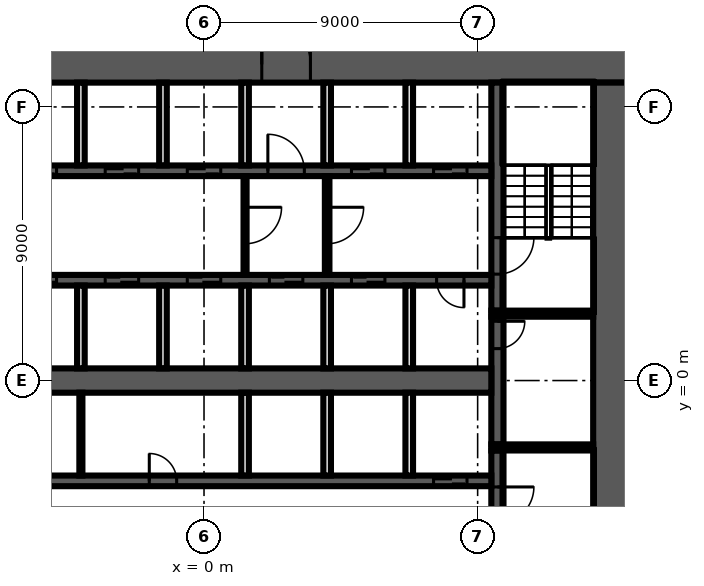
"""IFC4 building model, lengths in metres.
Left out: names, types, materials, properties, quantities, classifications, styles, units other than length and angle.
Written with IfcOpenShell. Run it as: python <this file> out.ifc"""

import sys

from ifc_helpers import new_model, si_unit, direction, frame, frame_2d, origin, place, context, subcontext, project, spatial, rectangle, extrude, element, fill, save


model = new_model("IFC4")
c1 = context("Model", 3, precision=1e-05, world=origin(), true_north=direction((0.0, 1.0)))
c2 = subcontext(c1, "Body", "Model", "MODEL_VIEW")
j1 = project(units=[si_unit("LENGTHUNIT", "METRE"), si_unit("PLANEANGLEUNIT", "RADIAN")], contexts=[c1])
p1 = place(None, origin())
s1 = spatial("IfcSite", under=j1, at=p1, CompositionType="ELEMENT")
p2 = place(p1, origin())
s2 = spatial("IfcBuilding", under=s1, at=p2, CompositionType="ELEMENT")
p3 = place(p2, frame((0.0, 0.0, 19.0)))
s3 = spatial("IfcBuildingStorey", under=s2, at=p3, CompositionType="ELEMENT", Elevation=19.0)
p4 = place(p3, frame((-14.0, 10.4, 0.0), z_axis=(0.0, 0.0, 1.0), x_axis=(1.0, 0.0, 0.0)))
e1 = element("IfcWall", 1, at=p4, inside=s3, PredefinedType="SHEAR", context=c2, shape_type="SweptSolid", body=[
    extrude(rectangle(XDim=28.0, YDim=1.2, at=frame_2d((14.0, 0.0))), origin(), (0.0, 0.0, 1.0), 7.55),
])
p5 = place(p4, frame((15.9, 0.0, 0.0)))
e2 = element("IfcOpeningElement", 2, at=p5, cuts=e1, PredefinedType="OPENING", context=c2, shape_type="SweptSolid", body=[
    extrude(rectangle(XDim=1.6, YDim=2.1, at=frame_2d((0.8, 1.05))), frame((0.0, 0.61, 0.0), z_axis=(0.0, -1.0, 0.0), x_axis=(1.0, 0.0, 0.0)), (0.0, 0.0, 1.0), 1.22),
])
p6 = place(p3, frame((13.4, 9.8, 0.0), z_axis=(0.0, 0.0, 1.0), x_axis=(0.0, -1.0, 0.0)))
e3 = element("IfcWall", 3, at=p6, inside=s3, PredefinedType="SHEAR", context=c2, shape_type="SweptSolid", body=[
    extrude(rectangle(XDim=19.6, YDim=1.2, at=frame_2d((9.8, 0.0))), origin(), (0.0, 0.0, 1.0), 7.55),
])
p7 = place(p3, frame((9.65, -2.3, 0.0), z_axis=(0.0, 0.0, 1.0), x_axis=(0.0, -1.0, 0.0)))
e4 = element("IfcWall", 4, at=p7, inside=s3, PredefinedType="SHEAR", context=c2, shape_type="SweptSolid", body=[
    extrude(rectangle(XDim=7.5, YDim=0.4, at=frame_2d((3.75, 0.0))), origin(), (0.0, 0.0, 1.0), 7.55),
])
p8 = place(p7, frame((1.2, 0.0, 0.0)))
e5 = element("IfcOpeningElement", 5, at=p8, cuts=e4, PredefinedType="OPENING", context=c2, shape_type="SweptSolid", body=[
    extrude(rectangle(XDim=1.2, YDim=2.1, at=frame_2d((0.6, 1.05))), frame((0.0, 0.21, 0.0), z_axis=(0.0, -1.0, 0.0), x_axis=(1.0, 0.0, 0.0)), (0.0, 0.0, 1.0), 0.42),
])
p9 = place(p3, frame((9.65, 2.1, 0.0), z_axis=(0.0, 0.0, 1.0), x_axis=(0.0, -1.0, 0.0)))
e6 = element("IfcWall", 6, at=p9, inside=s3, PredefinedType="SHEAR", context=c2, shape_type="SweptSolid", body=[
    extrude(rectangle(XDim=4.2, YDim=0.4, at=frame_2d((2.1, 0.0))), origin(), (0.0, 0.0, 1.0), 7.55),
])
p10 = place(p9, frame((0.15, 0.0, 0.0)))
e7 = element("IfcOpeningElement", 7, at=p10, cuts=e6, PredefinedType="OPENING", context=c2, shape_type="SweptSolid", body=[
    extrude(rectangle(XDim=0.9, YDim=2.1, at=frame_2d((0.45, 1.05))), frame((0.0, 0.21, 0.0), z_axis=(0.0, -1.0, 0.0), x_axis=(1.0, 0.0, 0.0)), (0.0, 0.0, 1.0), 0.42),
])
p11 = place(p3, frame((9.65, 9.8, 0.0), z_axis=(0.0, 0.0, 1.0), x_axis=(0.0, -1.0, 0.0)))
e8 = element("IfcWall", 8, at=p11, inside=s3, PredefinedType="SHEAR", context=c2, shape_type="SweptSolid", body=[
    extrude(rectangle(XDim=7.5, YDim=0.4, at=frame_2d((3.75, 0.0))), origin(), (0.0, 0.0, 1.0), 7.55),
])
p12 = place(p11, frame((5.1, 0.0, 0.0)))
e9 = element("IfcOpeningElement", 9, at=p12, cuts=e8, PredefinedType="OPENING", context=c2, shape_type="SweptSolid", body=[
    extrude(rectangle(XDim=1.2, YDim=2.1, at=frame_2d((0.6, 1.05))), frame((0.0, 0.21, 0.0), z_axis=(0.0, -1.0, 0.0), x_axis=(1.0, 0.0, 0.0)), (0.0, 0.0, 1.0), 0.42),
])
for number, where, z_axis, x_axis in (
    (10, (9.45, 2.2, 0.0), (0.0, 0.0, 1.0), (1.0, 0.0, 0.0)),
    (11, (9.45, -2.2, 0.0), (0.0, 0.0, 1.0), (1.0, 0.0, 0.0)),
):
    element("IfcWall", number, at=place(p3, frame(where, z_axis=z_axis, x_axis=x_axis)), inside=s3, PredefinedType="SHEAR", context=c2, shape_type="SweptSolid", body=[
        extrude(rectangle(XDim=3.35, YDim=0.2, at=frame_2d((1.675, 0.0))), origin(), (0.0, 0.0, 1.0), 7.55),
    ])
p13 = place(p3, frame((-9.45, 6.9, 0.0), z_axis=(0.0, 0.0, 1.0), x_axis=(1.0, 0.0, 0.0)))
e12 = element("IfcWall", 12, at=p13, inside=s3, PredefinedType="SHEAR", context=c2, shape_type="SweptSolid", body=[
    extrude(rectangle(XDim=18.9, YDim=0.35, at=frame_2d((9.45, 0.0))), origin(), (0.0, 0.0, 1.0), 7.55),
])
p14 = place(p13, frame((0.8, 0.0, 0.0)))
e13 = element("IfcOpeningElement", 13, at=p14, cuts=e12, PredefinedType="OPENING", context=c2, shape_type="SweptSolid", body=[
    extrude(rectangle(XDim=1.1, YDim=2.1, at=frame_2d((0.55, 1.05))), frame((0.0, 0.185, 0.0), z_axis=(0.0, -1.0, 0.0), x_axis=(1.0, 0.0, 0.0)), (0.0, 0.0, 1.0), 0.37),
])
p15 = place(p13, frame((3.5, 0.0, 0.0)))
e14 = element("IfcOpeningElement", 14, at=p15, cuts=e12, PredefinedType="OPENING", context=c2, shape_type="SweptSolid", body=[
    extrude(rectangle(XDim=1.1, YDim=2.1, at=frame_2d((0.55, 1.05))), frame((0.0, 0.185, 0.0), z_axis=(0.0, -1.0, 0.0), x_axis=(1.0, 0.0, 0.0)), (0.0, 0.0, 1.0), 0.37),
])
p16 = place(p13, frame((6.2, 0.0, 0.0)))
e15 = element("IfcOpeningElement", 15, at=p16, cuts=e12, PredefinedType="OPENING", context=c2, shape_type="SweptSolid", body=[
    extrude(rectangle(XDim=1.1, YDim=2.1, at=frame_2d((0.55, 1.05))), frame((0.0, 0.185, 0.0), z_axis=(0.0, -1.0, 0.0), x_axis=(1.0, 0.0, 0.0)), (0.0, 0.0, 1.0), 0.37),
])
p17 = place(p13, frame((8.9, 0.0, 0.0)))
e16 = element("IfcOpeningElement", 16, at=p17, cuts=e12, PredefinedType="OPENING", context=c2, shape_type="SweptSolid", body=[
    extrude(rectangle(XDim=1.1, YDim=2.1, at=frame_2d((0.55, 1.05))), frame((0.0, 0.185, 0.0), z_axis=(0.0, -1.0, 0.0), x_axis=(1.0, 0.0, 0.0)), (0.0, 0.0, 1.0), 0.37),
])
p18 = place(p13, frame((11.55, 0.0, 0.0)))
e17 = element("IfcOpeningElement", 17, at=p18, cuts=e12, PredefinedType="OPENING", context=c2, shape_type="SweptSolid", body=[
    extrude(rectangle(XDim=1.2, YDim=2.1, at=frame_2d((0.6, 1.05))), frame((0.0, 0.185, 0.0), z_axis=(0.0, -1.0, 0.0), x_axis=(1.0, 0.0, 0.0)), (0.0, 0.0, 1.0), 0.37),
])
p19 = place(p13, frame((14.3, 0.0, 0.0)))
e18 = element("IfcOpeningElement", 18, at=p19, cuts=e12, PredefinedType="OPENING", context=c2, shape_type="SweptSolid", body=[
    extrude(rectangle(XDim=1.1, YDim=2.1, at=frame_2d((0.55, 1.05))), frame((0.0, 0.185, 0.0), z_axis=(0.0, -1.0, 0.0), x_axis=(1.0, 0.0, 0.0)), (0.0, 0.0, 1.0), 0.37),
])
p20 = place(p13, frame((17.0, 0.0, 0.0)))
e19 = element("IfcOpeningElement", 19, at=p20, cuts=e12, PredefinedType="OPENING", context=c2, shape_type="SweptSolid", body=[
    extrude(rectangle(XDim=1.1, YDim=2.1, at=frame_2d((0.55, 1.05))), frame((0.0, 0.185, 0.0), z_axis=(0.0, -1.0, 0.0), x_axis=(1.0, 0.0, 0.0)), (0.0, 0.0, 1.0), 0.37),
])
p21 = place(p3, frame((9.45, 3.3, 0.0), z_axis=(0.0, 0.0, 1.0), x_axis=(-1.0, 0.0, 0.0)))
e20 = element("IfcWall", 20, at=p21, inside=s3, PredefinedType="SHEAR", context=c2, shape_type="SweptSolid", body=[
    extrude(rectangle(XDim=18.9, YDim=0.35, at=frame_2d((9.45, 0.0))), origin(), (0.0, 0.0, 1.0), 7.55),
])
p22 = place(p21, frame((17.0, 0.0, 0.0)))
e21 = element("IfcOpeningElement", 21, at=p22, cuts=e20, PredefinedType="OPENING", context=c2, shape_type="SweptSolid", body=[
    extrude(rectangle(XDim=1.1, YDim=2.1, at=frame_2d((0.55, 1.05))), frame((0.0, 0.185, 0.0), z_axis=(0.0, -1.0, 0.0), x_axis=(1.0, 0.0, 0.0)), (0.0, 0.0, 1.0), 0.37),
])
p23 = place(p21, frame((14.3, 0.0, 0.0)))
e22 = element("IfcOpeningElement", 22, at=p23, cuts=e20, PredefinedType="OPENING", context=c2, shape_type="SweptSolid", body=[
    extrude(rectangle(XDim=1.1, YDim=2.1, at=frame_2d((0.55, 1.05))), frame((0.0, 0.185, 0.0), z_axis=(0.0, -1.0, 0.0), x_axis=(1.0, 0.0, 0.0)), (0.0, 0.0, 1.0), 0.37),
])
p24 = place(p21, frame((11.6, 0.0, 0.0)))
e23 = element("IfcOpeningElement", 23, at=p24, cuts=e20, PredefinedType="OPENING", context=c2, shape_type="SweptSolid", body=[
    extrude(rectangle(XDim=1.1, YDim=2.1, at=frame_2d((0.55, 1.05))), frame((0.0, 0.185, 0.0), z_axis=(0.0, -1.0, 0.0), x_axis=(1.0, 0.0, 0.0)), (0.0, 0.0, 1.0), 0.37),
])
p25 = place(p21, frame((8.9, 0.0, 0.0)))
e24 = element("IfcOpeningElement", 24, at=p25, cuts=e20, PredefinedType="OPENING", context=c2, shape_type="SweptSolid", body=[
    extrude(rectangle(XDim=1.1, YDim=2.1, at=frame_2d((0.55, 1.05))), frame((0.0, 0.185, 0.0), z_axis=(0.0, -1.0, 0.0), x_axis=(1.0, 0.0, 0.0)), (0.0, 0.0, 1.0), 0.37),
])
p26 = place(p21, frame((6.2, 0.0, 0.0)))
e25 = element("IfcOpeningElement", 25, at=p26, cuts=e20, PredefinedType="OPENING", context=c2, shape_type="SweptSolid", body=[
    extrude(rectangle(XDim=1.1, YDim=2.1, at=frame_2d((0.55, 1.05))), frame((0.0, 0.185, 0.0), z_axis=(0.0, -1.0, 0.0), x_axis=(1.0, 0.0, 0.0)), (0.0, 0.0, 1.0), 0.37),
])
p27 = place(p21, frame((3.5, 0.0, 0.0)))
e26 = element("IfcOpeningElement", 26, at=p27, cuts=e20, PredefinedType="OPENING", context=c2, shape_type="SweptSolid", body=[
    extrude(rectangle(XDim=1.1, YDim=2.1, at=frame_2d((0.55, 1.05))), frame((0.0, 0.185, 0.0), z_axis=(0.0, -1.0, 0.0), x_axis=(1.0, 0.0, 0.0)), (0.0, 0.0, 1.0), 0.37),
])
p28 = place(p21, frame((0.9, 0.0, 0.0)))
e27 = element("IfcOpeningElement", 27, at=p28, cuts=e20, PredefinedType="OPENING", context=c2, shape_type="SweptSolid", body=[
    extrude(rectangle(XDim=0.9, YDim=2.1, at=frame_2d((0.45, 1.05))), frame((0.0, 0.185, 0.0), z_axis=(0.0, -1.0, 0.0), x_axis=(1.0, 0.0, 0.0)), (0.0, 0.0, 1.0), 0.37),
])
p29 = place(p3, frame((-9.45, -3.3, 0.0), z_axis=(0.0, 0.0, 1.0), x_axis=(1.0, 0.0, 0.0)))
e28 = element("IfcWall", 28, at=p29, inside=s3, PredefinedType="SHEAR", context=c2, shape_type="SweptSolid", body=[
    extrude(rectangle(XDim=18.9, YDim=0.35, at=frame_2d((9.45, 0.0))), origin(), (0.0, 0.0, 1.0), 7.55),
])
p30 = place(p29, frame((17.0, 0.0, 0.0)))
e29 = element("IfcOpeningElement", 29, at=p30, cuts=e28, PredefinedType="OPENING", context=c2, shape_type="SweptSolid", body=[
    extrude(rectangle(XDim=1.1, YDim=2.1, at=frame_2d((0.55, 1.05))), frame((0.0, 0.185, 0.0), z_axis=(0.0, -1.0, 0.0), x_axis=(1.0, 0.0, 0.0)), (0.0, 0.0, 1.0), 0.37),
])
p31 = place(p29, frame((2.25, 0.0, 0.0)))
e30 = element("IfcOpeningElement", 30, at=p31, cuts=e28, PredefinedType="OPENING", context=c2, shape_type="SweptSolid", body=[
    extrude(rectangle(XDim=0.9, YDim=2.1, at=frame_2d((0.45, 1.05))), frame((0.0, 0.185, 0.0), z_axis=(0.0, -1.0, 0.0), x_axis=(1.0, 0.0, 0.0)), (0.0, 0.0, 1.0), 0.37),
])
p32 = place(p29, frame((7.65, 0.0, 0.0)))
e31 = element("IfcOpeningElement", 31, at=p32, cuts=e28, PredefinedType="OPENING", context=c2, shape_type="SweptSolid", body=[
    extrude(rectangle(XDim=0.9, YDim=2.1, at=frame_2d((0.45, 1.05))), frame((0.0, 0.185, 0.0), z_axis=(0.0, -1.0, 0.0), x_axis=(1.0, 0.0, 0.0)), (0.0, 0.0, 1.0), 0.37),
])
p33 = place(p3, frame((-9.45, 0.0, 0.0), z_axis=(0.0, 0.0, 1.0), x_axis=(1.0, 0.0, 0.0)))
e32 = element("IfcWall", 32, at=p33, inside=s3, PredefinedType="SHEAR", context=c2, shape_type="SweptSolid", body=[
    extrude(rectangle(XDim=18.9, YDim=0.8, at=frame_2d((9.45, 0.0))), origin(), (0.0, 0.0, 1.0), 7.55),
])
for number, where, z_axis, x_axis in (
    (33, (6.75, -3.125, 0.0), (0.0, 0.0, 1.0), (0.0, 1.0, 0.0)),
    (34, (6.75, 0.4, 0.0), (0.0, 0.0, 1.0), (0.0, 1.0, 0.0)),
    (35, (6.75, 7.075, 0.0), (0.0, 0.0, 1.0), (0.0, 1.0, 0.0)),
):
    element("IfcWall", number, at=place(p3, frame(where, z_axis=z_axis, x_axis=x_axis)), inside=s3, PredefinedType="SOLIDWALL", context=c2, shape_type="SweptSolid", body=[
        extrude(rectangle(XDim=2.725, YDim=0.25, at=frame_2d((1.363, 0.0))), origin(), (0.0, 0.0, 1.0), 7.55),
    ])
p34 = place(p3, frame((4.05, 6.725, 0.0), z_axis=(0.0, 0.0, 1.0), x_axis=(0.0, -1.0, 0.0)))
e36 = element("IfcWall", 36, at=p34, inside=s3, PredefinedType="PARTITIONING", context=c2, shape_type="SweptSolid", body=[
    extrude(rectangle(XDim=3.25, YDim=0.15, at=frame_2d((1.625, 0.0))), origin(), (0.0, 0.0, 1.0), 7.55),
])
p35 = place(p34, frame((1.025, 0.0, 0.0)))
e37 = element("IfcOpeningElement", 37, at=p35, cuts=e36, PredefinedType="OPENING", context=c2, shape_type="SweptSolid", body=[
    extrude(rectangle(XDim=1.2, YDim=2.1, at=frame_2d((0.6, 1.05))), frame((0.0, 0.085, 0.0), z_axis=(0.0, -1.0, 0.0), x_axis=(1.0, 0.0, 0.0)), (0.0, 0.0, 1.0), 0.17),
])
for number, where, z_axis, x_axis in (
    (38, (4.05, -3.125, 0.0), (0.0, 0.0, 1.0), (0.0, 1.0, 0.0)),
    (39, (4.05, 0.4, 0.0), (0.0, 0.0, 1.0), (0.0, 1.0, 0.0)),
    (40, (4.05, 7.075, 0.0), (0.0, 0.0, 1.0), (0.0, 1.0, 0.0)),
):
    element("IfcWall", number, at=place(p3, frame(where, z_axis=z_axis, x_axis=x_axis)), inside=s3, PredefinedType="SOLIDWALL", context=c2, shape_type="SweptSolid", body=[
        extrude(rectangle(XDim=2.725, YDim=0.25, at=frame_2d((1.363, 0.0))), origin(), (0.0, 0.0, 1.0), 7.55),
    ])
p36 = place(p3, frame((1.35, 6.725, 0.0), z_axis=(0.0, 0.0, 1.0), x_axis=(0.0, -1.0, 0.0)))
e41 = element("IfcWall", 41, at=p36, inside=s3, PredefinedType="PARTITIONING", context=c2, shape_type="SweptSolid", body=[
    extrude(rectangle(XDim=3.25, YDim=0.1, at=frame_2d((1.625, 0.0))), origin(), (0.0, 0.0, 1.0), 7.55),
])
p37 = place(p36, frame((1.025, 0.0, 0.0)))
e42 = element("IfcOpeningElement", 42, at=p37, cuts=e41, PredefinedType="OPENING", context=c2, shape_type="SweptSolid", body=[
    extrude(rectangle(XDim=1.2, YDim=2.1, at=frame_2d((0.6, 1.05))), frame((0.0, 0.06, 0.0), z_axis=(0.0, -1.0, 0.0), x_axis=(1.0, 0.0, 0.0)), (0.0, 0.0, 1.0), 0.12),
])
for number, where, z_axis, x_axis in (
    (43, (1.35, -3.125, 0.0), (0.0, 0.0, 1.0), (0.0, 1.0, 0.0)),
    (44, (1.35, 0.4, 0.0), (0.0, 0.0, 1.0), (0.0, 1.0, 0.0)),
    (45, (1.35, 7.075, 0.0), (0.0, 0.0, 1.0), (0.0, 1.0, 0.0)),
    (46, (-1.35, 0.4, 0.0), (0.0, 0.0, 1.0), (0.0, 1.0, 0.0)),
    (47, (-1.35, 7.075, 0.0), (0.0, 0.0, 1.0), (0.0, 1.0, 0.0)),
):
    element("IfcWall", number, at=place(p3, frame(where, z_axis=z_axis, x_axis=x_axis)), inside=s3, PredefinedType="SOLIDWALL", context=c2, shape_type="SweptSolid", body=[
        extrude(rectangle(XDim=2.725, YDim=0.25, at=frame_2d((1.363, 0.0))), origin(), (0.0, 0.0, 1.0), 7.55),
    ])
p38 = place(p3, frame((-4.05, -3.125, 0.0), z_axis=(0.0, 0.0, 1.0), x_axis=(0.0, 1.0, 0.0)))
e48 = element("IfcWall", 48, at=p38, inside=s3, PredefinedType="PARTITIONING", context=c2, shape_type="SweptSolid", body=[
    extrude(rectangle(XDim=2.725, YDim=0.1, at=frame_2d((1.363, 0.0))), origin(), (0.0, 0.0, 1.0), 7.55),
])
for number, where, z_axis, x_axis in (
    (49, (-4.05, 0.4, 0.0), (0.0, 0.0, 1.0), (0.0, 1.0, 0.0)),
    (50, (-4.05, 7.075, 0.0), (0.0, 0.0, 1.0), (0.0, 1.0, 0.0)),
):
    element("IfcWall", number, at=place(p3, frame(where, z_axis=z_axis, x_axis=x_axis)), inside=s3, PredefinedType="SOLIDWALL", context=c2, shape_type="SweptSolid", body=[
        extrude(rectangle(XDim=2.725, YDim=0.25, at=frame_2d((1.363, 0.0))), origin(), (0.0, 0.0, 1.0), 7.55),
    ])
p39 = place(p10, origin())
e51 = element("IfcDoor", 51, at=p39, inside=s3, OperationType="SINGLE_SWING_RIGHT", PredefinedType="DOOR", context=c2, shape_type="SweptSolid", body=[
    extrude(rectangle(XDim=0.9, YDim=2.1, at=frame_2d((0.45, 1.05))), frame((0.0, 0.025, 0.0), z_axis=(0.0, -1.0, 0.0), x_axis=(1.0, 0.0, 0.0)), (0.0, 0.0, 1.0), 0.05),
])
fill(e7, e51)
p40 = place(p15, origin())
e52 = element("IfcDoor", 52, at=p40, inside=s3, OperationType="DOUBLE_DOOR_SLIDING", PredefinedType="DOOR", context=c2, shape_type="SweptSolid", body=[
    extrude(rectangle(XDim=1.1, YDim=2.1, at=frame_2d((0.55, 1.05))), frame((0.0, 0.025, 0.0), z_axis=(0.0, -1.0, 0.0), x_axis=(1.0, 0.0, 0.0)), (0.0, 0.0, 1.0), 0.05),
])
fill(e14, e52)
p41 = place(p16, origin())
e53 = element("IfcDoor", 53, at=p41, inside=s3, OperationType="DOUBLE_DOOR_SLIDING", PredefinedType="DOOR", context=c2, shape_type="SweptSolid", body=[
    extrude(rectangle(XDim=1.1, YDim=2.1, at=frame_2d((0.55, 1.05))), frame((0.0, 0.025, 0.0), z_axis=(0.0, -1.0, 0.0), x_axis=(1.0, 0.0, 0.0)), (0.0, 0.0, 1.0), 0.05),
])
fill(e15, e53)
p42 = place(p17, origin())
e54 = element("IfcDoor", 54, at=p42, inside=s3, OperationType="DOUBLE_DOOR_SLIDING", PredefinedType="DOOR", context=c2, shape_type="SweptSolid", body=[
    extrude(rectangle(XDim=1.1, YDim=2.1, at=frame_2d((0.55, 1.05))), frame((0.0, 0.025, 0.0), z_axis=(0.0, -1.0, 0.0), x_axis=(1.0, 0.0, 0.0)), (0.0, 0.0, 1.0), 0.05),
])
fill(e16, e54)
p43 = place(p5, origin())
e55 = element("IfcDoor", 55, at=p43, inside=s3, OperationType="DOUBLE_DOOR_SINGLE_SWING", PredefinedType="DOOR", context=c2, shape_type="SweptSolid", body=[
    extrude(rectangle(XDim=1.6, YDim=2.1, at=frame_2d((0.8, 1.05))), frame((0.0, 0.025, 0.0), z_axis=(0.0, -1.0, 0.0), x_axis=(1.0, 0.0, 0.0)), (0.0, 0.0, 1.0), 0.05),
])
fill(e2, e55)
p44 = place(p18, origin())
e56 = element("IfcDoor", 56, at=p44, inside=s3, OperationType="SINGLE_SWING_LEFT", PredefinedType="DOOR", context=c2, shape_type="SweptSolid", body=[
    extrude(rectangle(XDim=1.2, YDim=2.1, at=frame_2d((0.6, 1.05))), frame((0.0, 0.025, 0.0), z_axis=(0.0, -1.0, 0.0), x_axis=(1.0, 0.0, 0.0)), (0.0, 0.0, 1.0), 0.05),
])
fill(e17, e56)
p45 = place(p19, origin())
e57 = element("IfcDoor", 57, at=p45, inside=s3, OperationType="DOUBLE_DOOR_SLIDING", PredefinedType="DOOR", context=c2, shape_type="SweptSolid", body=[
    extrude(rectangle(XDim=1.1, YDim=2.1, at=frame_2d((0.55, 1.05))), frame((0.0, 0.025, 0.0), z_axis=(0.0, -1.0, 0.0), x_axis=(1.0, 0.0, 0.0)), (0.0, 0.0, 1.0), 0.05),
])
fill(e18, e57)
p46 = place(p20, origin())
e58 = element("IfcDoor", 58, at=p46, inside=s3, OperationType="DOUBLE_DOOR_SLIDING", PredefinedType="DOOR", context=c2, shape_type="SweptSolid", body=[
    extrude(rectangle(XDim=1.1, YDim=2.1, at=frame_2d((0.55, 1.05))), frame((0.0, 0.025, 0.0), z_axis=(0.0, -1.0, 0.0), x_axis=(1.0, 0.0, 0.0)), (0.0, 0.0, 1.0), 0.05),
])
fill(e19, e58)
p47 = place(p23, origin())
e59 = element("IfcDoor", 59, at=p47, inside=s3, OperationType="DOUBLE_DOOR_SLIDING", PredefinedType="DOOR", context=c2, shape_type="SweptSolid", body=[
    extrude(rectangle(XDim=1.1, YDim=2.1, at=frame_2d((0.55, 1.05))), frame((0.0, 0.025, 0.0), z_axis=(0.0, -1.0, 0.0), x_axis=(1.0, 0.0, 0.0)), (0.0, 0.0, 1.0), 0.05),
])
fill(e22, e59)
p48 = place(p24, origin())
e60 = element("IfcDoor", 60, at=p48, inside=s3, OperationType="DOUBLE_DOOR_SLIDING", PredefinedType="DOOR", context=c2, shape_type="SweptSolid", body=[
    extrude(rectangle(XDim=1.1, YDim=2.1, at=frame_2d((0.55, 1.05))), frame((0.0, 0.025, 0.0), z_axis=(0.0, -1.0, 0.0), x_axis=(1.0, 0.0, 0.0)), (0.0, 0.0, 1.0), 0.05),
])
fill(e23, e60)
p49 = place(p25, origin())
e61 = element("IfcDoor", 61, at=p49, inside=s3, OperationType="DOUBLE_DOOR_SLIDING", PredefinedType="DOOR", context=c2, shape_type="SweptSolid", body=[
    extrude(rectangle(XDim=1.1, YDim=2.1, at=frame_2d((0.55, 1.05))), frame((0.0, 0.025, 0.0), z_axis=(0.0, -1.0, 0.0), x_axis=(1.0, 0.0, 0.0)), (0.0, 0.0, 1.0), 0.05),
])
fill(e24, e61)
p50 = place(p26, origin())
e62 = element("IfcDoor", 62, at=p50, inside=s3, OperationType="DOUBLE_DOOR_SLIDING", PredefinedType="DOOR", context=c2, shape_type="SweptSolid", body=[
    extrude(rectangle(XDim=1.1, YDim=2.1, at=frame_2d((0.55, 1.05))), frame((0.0, 0.025, 0.0), z_axis=(0.0, -1.0, 0.0), x_axis=(1.0, 0.0, 0.0)), (0.0, 0.0, 1.0), 0.05),
])
fill(e25, e62)
p51 = place(p27, origin())
e63 = element("IfcDoor", 63, at=p51, inside=s3, OperationType="DOUBLE_DOOR_SLIDING", PredefinedType="DOOR", context=c2, shape_type="SweptSolid", body=[
    extrude(rectangle(XDim=1.1, YDim=2.1, at=frame_2d((0.55, 1.05))), frame((0.0, 0.025, 0.0), z_axis=(0.0, -1.0, 0.0), x_axis=(1.0, 0.0, 0.0)), (0.0, 0.0, 1.0), 0.05),
])
fill(e26, e63)
p52 = place(p28, origin())
e64 = element("IfcDoor", 64, at=p52, inside=s3, OperationType="SINGLE_SWING_LEFT", PredefinedType="DOOR", context=c2, shape_type="SweptSolid", body=[
    extrude(rectangle(XDim=0.9, YDim=2.1, at=frame_2d((0.45, 1.05))), frame((0.0, 0.025, 0.0), z_axis=(0.0, -1.0, 0.0), x_axis=(1.0, 0.0, 0.0)), (0.0, 0.0, 1.0), 0.05),
])
fill(e27, e64)
p53 = place(p30, origin())
e65 = element("IfcDoor", 65, at=p53, inside=s3, OperationType="DOUBLE_DOOR_SLIDING", PredefinedType="DOOR", context=c2, shape_type="SweptSolid", body=[
    extrude(rectangle(XDim=1.1, YDim=2.1, at=frame_2d((0.55, 1.05))), frame((0.0, 0.025, 0.0), z_axis=(0.0, -1.0, 0.0), x_axis=(1.0, 0.0, 0.0)), (0.0, 0.0, 1.0), 0.05),
])
fill(e29, e65)
p54 = place(p32, origin())
e66 = element("IfcDoor", 66, at=p54, inside=s3, OperationType="SINGLE_SWING_LEFT", PredefinedType="DOOR", context=c2, shape_type="SweptSolid", body=[
    extrude(rectangle(XDim=0.9, YDim=2.1, at=frame_2d((0.45, 1.05))), frame((0.0, 0.025, 0.0), z_axis=(0.0, -1.0, 0.0), x_axis=(1.0, 0.0, 0.0)), (0.0, 0.0, 1.0), 0.05),
])
fill(e31, e66)
p55 = place(p12, origin())
e67 = element("IfcDoor", 67, at=p55, inside=s3, OperationType="SINGLE_SWING_LEFT", PredefinedType="DOOR", context=c2, shape_type="SweptSolid", body=[
    extrude(rectangle(XDim=1.2, YDim=2.1, at=frame_2d((0.6, 1.05))), frame((0.0, 0.025, 0.0), z_axis=(0.0, -1.0, 0.0), x_axis=(1.0, 0.0, 0.0)), (0.0, 0.0, 1.0), 0.05),
])
fill(e9, e67)
p56 = place(p8, origin())
e68 = element("IfcDoor", 68, at=p56, inside=s3, OperationType="SINGLE_SWING_RIGHT", PredefinedType="DOOR", context=c2, shape_type="SweptSolid", body=[
    extrude(rectangle(XDim=1.2, YDim=2.1, at=frame_2d((0.6, 1.05))), frame((0.0, 0.025, 0.0), z_axis=(0.0, -1.0, 0.0), x_axis=(1.0, 0.0, 0.0)), (0.0, 0.0, 1.0), 0.05),
])
fill(e5, e68)
p57 = place(p37, origin())
e69 = element("IfcDoor", 69, at=p57, inside=s3, OperationType="SINGLE_SWING_LEFT", PredefinedType="DOOR", context=c2, shape_type="SweptSolid", body=[
    extrude(rectangle(XDim=1.2, YDim=2.1, at=frame_2d((0.6, 1.05))), frame((0.0, 0.025, 0.0), z_axis=(0.0, -1.0, 0.0), x_axis=(1.0, 0.0, 0.0)), (0.0, 0.0, 1.0), 0.05),
])
fill(e42, e69)
p58 = place(p35, origin())
e70 = element("IfcDoor", 70, at=p58, inside=s3, OperationType="SINGLE_SWING_RIGHT", PredefinedType="DOOR", context=c2, shape_type="SweptSolid", body=[
    extrude(rectangle(XDim=1.2, YDim=2.1, at=frame_2d((0.6, 1.05))), frame((0.0, 0.025, 0.0), z_axis=(0.0, -1.0, 0.0), x_axis=(1.0, 0.0, 0.0)), (0.0, 0.0, 1.0), 0.05),
])
fill(e37, e70)
save(model, sys.argv[1])
